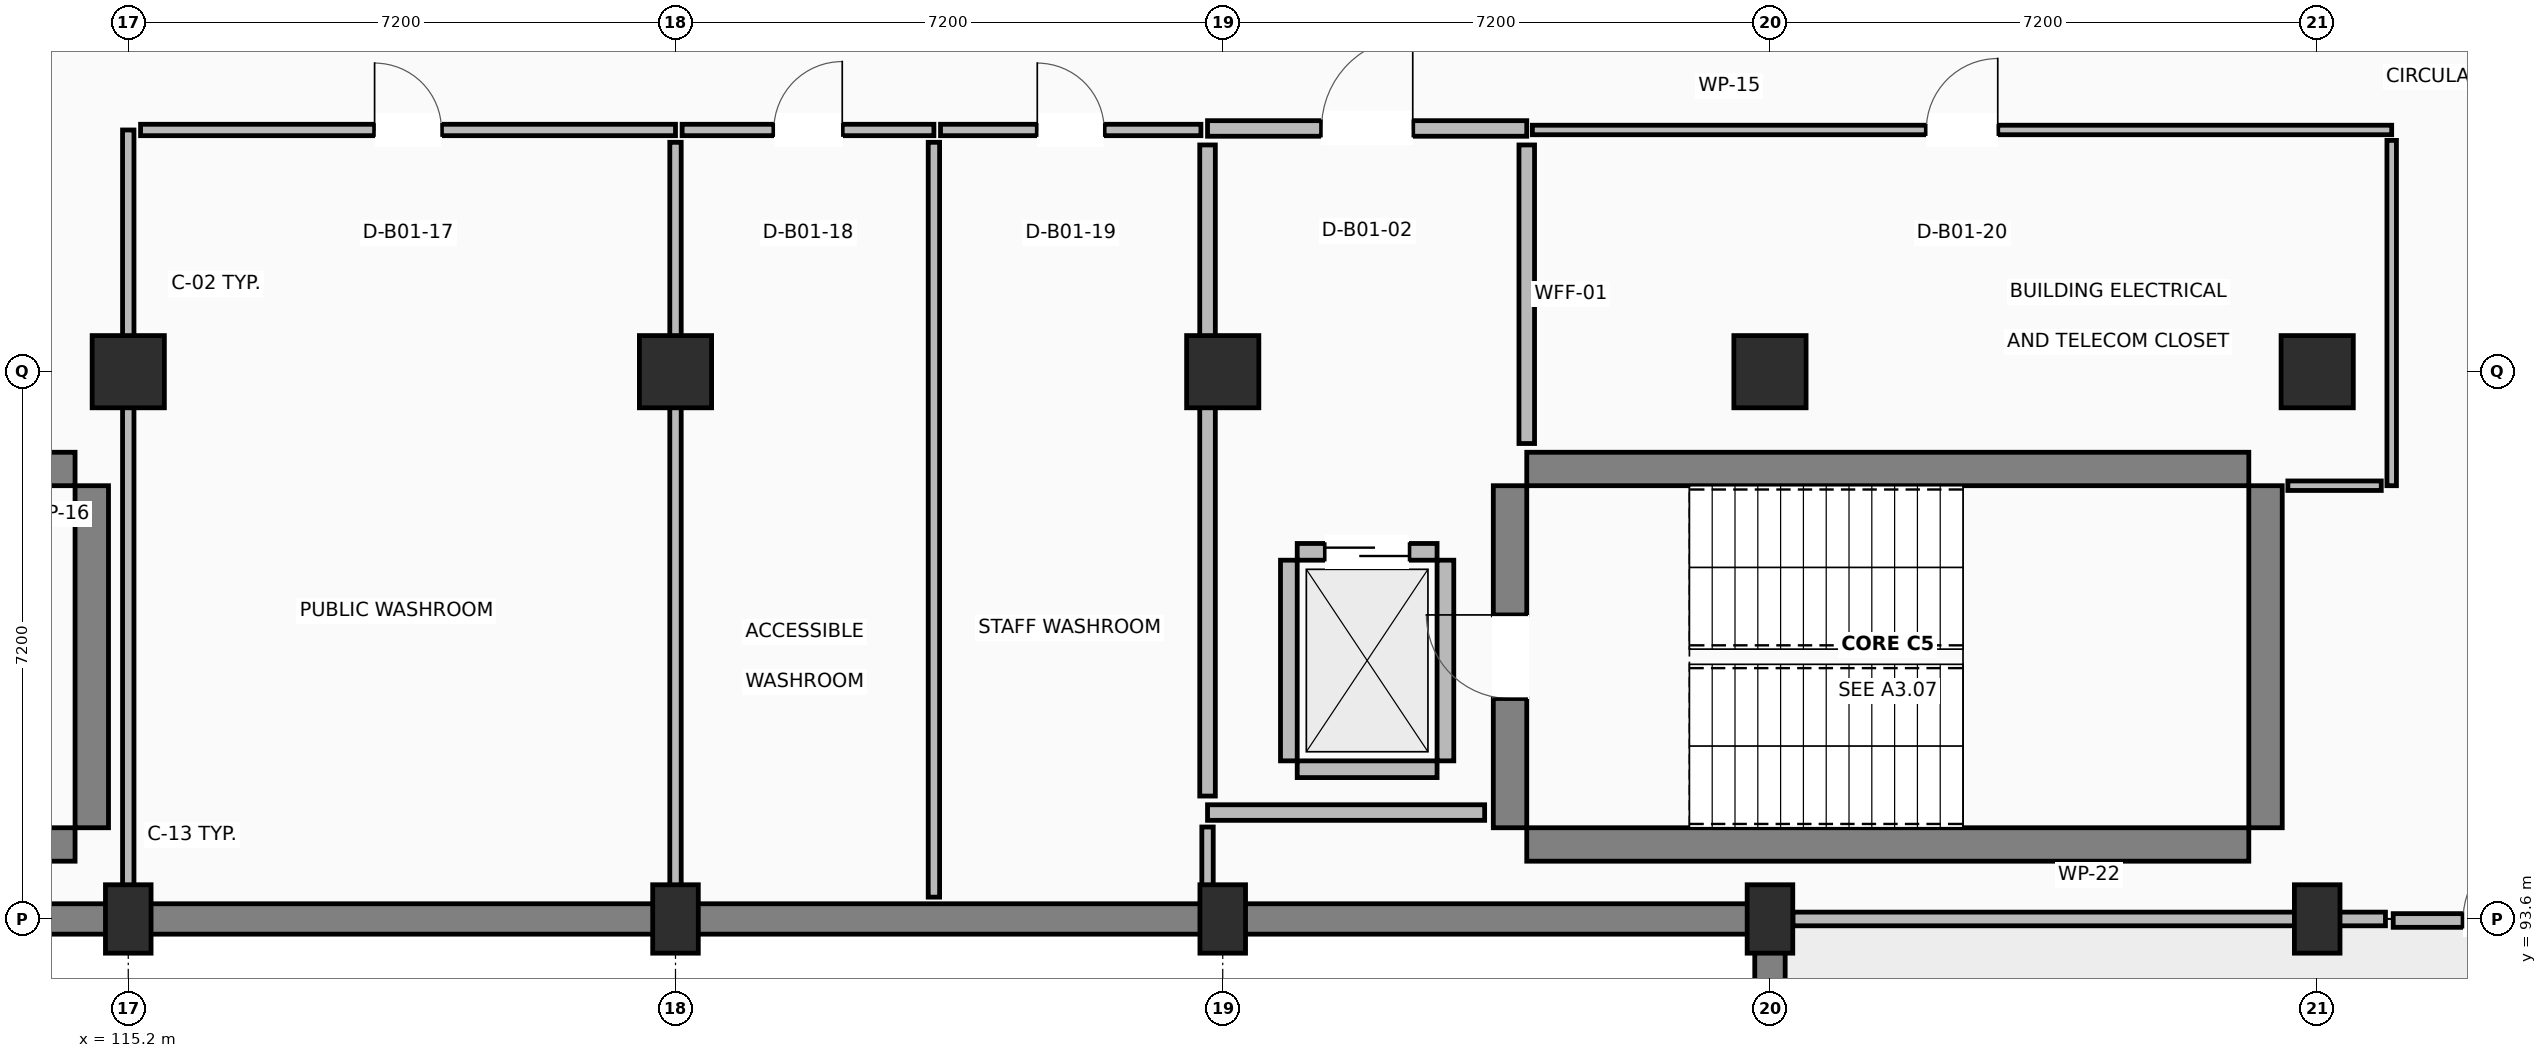
"""IFC4 building model, lengths in metres.
Left out: names, types, materials, properties, quantities, classifications, styles, units other than length and angle.
Written with IfcOpenShell. Run it as: python <this file> out.ifc"""

import sys

from ifc_helpers import new_model, si_unit, direction, frame, frame_2d, origin, origin_2d, place, context, subcontext, project, spatial, rectangle, extrude, element, fill, save


model = new_model("IFC4")
c1 = context("Model", 3, precision=1e-05, world=origin(), true_north=direction((0.0, 1.0)))
c2 = subcontext(c1, "Body", "Model", "MODEL_VIEW")
j1 = project(units=[si_unit("LENGTHUNIT", "METRE"), si_unit("PLANEANGLEUNIT", "RADIAN")], contexts=[c1])
p1 = place(None, origin())
s1 = spatial("IfcSite", under=j1, at=p1, CompositionType="ELEMENT")
p2 = place(p1, origin())
s2 = spatial("IfcBuilding", under=s1, at=p2, CompositionType="ELEMENT")
p3 = place(p2, frame((0.0, 0.0, -4.5)))
s3 = spatial("IfcBuildingStorey", under=s2, at=p3, CompositionType="ELEMENT", Elevation=-4.5)
p4 = place(p3, frame((115.2, 93.6, 0.0), z_axis=(0.0, 0.0, 1.0), x_axis=(1.0, 0.0, 0.0)))
e1 = element("IfcColumn", 1, at=p4, inside=s3, PredefinedType="COLUMN", context=c2, shape_type="SweptSolid", body=[
    extrude(rectangle(XDim=0.6, YDim=0.9, at=origin_2d()), origin(), (0.0, 0.0, 1.0), 4.15),
])
p5 = place(p3, frame((115.2, 100.8, 0.0), z_axis=(0.0, 0.0, 1.0), x_axis=(1.0, 0.0, 0.0)))
e2 = element("IfcColumn", 2, at=p5, inside=s3, PredefinedType="COLUMN", context=c2, shape_type="SweptSolid", body=[
    extrude(rectangle(XDim=0.95, YDim=0.95, at=origin_2d()), origin(), (0.0, 0.0, 1.0), 4.15),
])
p6 = place(p3, frame((122.4, 93.6, 0.0), z_axis=(0.0, 0.0, 1.0), x_axis=(1.0, 0.0, 0.0)))
e3 = element("IfcColumn", 3, at=p6, inside=s3, PredefinedType="COLUMN", context=c2, shape_type="SweptSolid", body=[
    extrude(rectangle(XDim=0.6, YDim=0.9, at=origin_2d()), origin(), (0.0, 0.0, 1.0), 4.15),
])
p7 = place(p3, frame((122.4, 100.8, 0.0), z_axis=(0.0, 0.0, 1.0), x_axis=(1.0, 0.0, 0.0)))
e4 = element("IfcColumn", 4, at=p7, inside=s3, PredefinedType="COLUMN", context=c2, shape_type="SweptSolid", body=[
    extrude(rectangle(XDim=0.95, YDim=0.95, at=origin_2d()), origin(), (0.0, 0.0, 1.0), 4.15),
])
p8 = place(p3, frame((129.6, 93.6, 0.0), z_axis=(0.0, 0.0, 1.0), x_axis=(1.0, 0.0, 0.0)))
e5 = element("IfcColumn", 5, at=p8, inside=s3, PredefinedType="COLUMN", context=c2, shape_type="SweptSolid", body=[
    extrude(rectangle(XDim=0.6, YDim=0.9, at=origin_2d()), origin(), (0.0, 0.0, 1.0), 4.15),
])
p9 = place(p3, frame((129.6, 100.8, 0.0), z_axis=(0.0, 0.0, 1.0), x_axis=(1.0, 0.0, 0.0)))
e6 = element("IfcColumn", 6, at=p9, inside=s3, PredefinedType="COLUMN", context=c2, shape_type="SweptSolid", body=[
    extrude(rectangle(XDim=0.95, YDim=0.95, at=origin_2d()), origin(), (0.0, 0.0, 1.0), 4.15),
])
p10 = place(p3, frame((136.8, 93.6, 0.0), z_axis=(0.0, 0.0, 1.0), x_axis=(1.0, 0.0, 0.0)))
e7 = element("IfcColumn", 7, at=p10, inside=s3, PredefinedType="COLUMN", context=c2, shape_type="SweptSolid", body=[
    extrude(rectangle(XDim=0.6, YDim=0.9, at=origin_2d()), origin(), (0.0, 0.0, 1.0), 4.15),
])
p11 = place(p3, frame((136.8, 100.8, 0.0), z_axis=(0.0, 0.0, 1.0), x_axis=(1.0, 0.0, 0.0)))
e8 = element("IfcColumn", 8, at=p11, inside=s3, PredefinedType="COLUMN", context=c2, shape_type="SweptSolid", body=[
    extrude(rectangle(XDim=0.95, YDim=0.95, at=origin_2d()), origin(), (0.0, 0.0, 1.0), 4.15),
])
p12 = place(p3, frame((144.0, 93.6, 0.0), z_axis=(0.0, 0.0, 1.0), x_axis=(1.0, 0.0, 0.0)))
e9 = element("IfcColumn", 9, at=p12, inside=s3, PredefinedType="COLUMN", context=c2, shape_type="SweptSolid", body=[
    extrude(rectangle(XDim=0.6, YDim=0.9, at=origin_2d()), origin(), (0.0, 0.0, 1.0), 4.15),
])
p13 = place(p3, frame((144.0, 100.8, 0.0), z_axis=(0.0, 0.0, 1.0), x_axis=(1.0, 0.0, 0.0)))
e10 = element("IfcColumn", 10, at=p13, inside=s3, PredefinedType="COLUMN", context=c2, shape_type="SweptSolid", body=[
    extrude(rectangle(XDim=0.95, YDim=0.95, at=origin_2d()), origin(), (0.0, 0.0, 1.0), 4.15),
])
p14 = place(p3, frame((136.8, 86.4, 0.0), z_axis=(0.0, 0.0, 1.0), x_axis=(0.0, 1.0, 0.0)))
e11 = element("IfcWall", 11, at=p14, inside=s3, PredefinedType="SOLIDWALL", context=c2, shape_type="SweptSolid", body=[
    extrude(rectangle(XDim=7.2, YDim=0.4, at=frame_2d((3.6, 0.0))), origin(), (0.0, 0.0, 1.0), 4.15),
])
p15 = place(p3, frame((136.8, 93.6, 0.0), z_axis=(0.0, 0.0, 1.0), x_axis=(-1.0, 0.0, 0.0)))
e12 = element("IfcWall", 12, at=p15, inside=s3, PredefinedType="SOLIDWALL", context=c2, shape_type="SweptSolid", body=[
    extrude(rectangle(XDim=79.2, YDim=0.4, at=frame_2d((39.6, 0.0))), origin(), (0.0, 0.0, 1.0), 4.15),
])
for number, where, z_axis, x_axis in (
    (13, (105.0, 94.58, 0.0), (0.0, 0.0, 1.0), (1.0, 0.0, 0.0)),
    (14, (105.0, 99.52, 0.0), (0.0, 0.0, 1.0), (1.0, 0.0, 0.0)),
):
    element("IfcWall", number, at=place(p3, frame(where, z_axis=z_axis, x_axis=x_axis)), inside=s3, PredefinedType="SHEAR", context=c2, shape_type="SweptSolid", body=[
        extrude(rectangle(XDim=9.5, YDim=0.44, at=frame_2d((4.75, 0.0))), origin(), (0.0, 0.0, 1.0), 4.15),
    ])
p16 = place(p3, frame((114.72, 94.8, 0.0), z_axis=(0.0, 0.0, 1.0), x_axis=(0.0, 1.0, 0.0)))
e15 = element("IfcWall", 15, at=p16, inside=s3, PredefinedType="SHEAR", context=c2, shape_type="SweptSolid", body=[
    extrude(rectangle(XDim=4.5, YDim=0.44, at=frame_2d((2.25, 0.0))), origin(), (0.0, 0.0, 1.0), 4.15),
])
for number, where, z_axis, x_axis in (
    (16, (133.6, 94.58, 0.0), (0.0, 0.0, 1.0), (1.0, 0.0, 0.0)),
    (17, (133.6, 99.52, 0.0), (0.0, 0.0, 1.0), (1.0, 0.0, 0.0)),
):
    element("IfcWall", number, at=place(p3, frame(where, z_axis=z_axis, x_axis=x_axis)), inside=s3, PredefinedType="SHEAR", context=c2, shape_type="SweptSolid", body=[
        extrude(rectangle(XDim=9.5, YDim=0.44, at=frame_2d((4.75, 0.0))), origin(), (0.0, 0.0, 1.0), 4.15),
    ])
p17 = place(p3, frame((133.38, 94.8, 0.0), z_axis=(0.0, 0.0, 1.0), x_axis=(0.0, 1.0, 0.0)))
e18 = element("IfcWall", 18, at=p17, inside=s3, PredefinedType="SHEAR", context=c2, shape_type="SweptSolid", body=[
    extrude(rectangle(XDim=4.5, YDim=0.44, at=frame_2d((2.25, 0.0))), origin(), (0.0, 0.0, 1.0), 4.15),
])
p18 = place(p17, frame((1.7, 0.0, 0.0)))
e19 = element("IfcOpeningElement", 19, at=p18, cuts=e18, PredefinedType="OPENING", context=c2, shape_type="SweptSolid", body=[
    extrude(rectangle(XDim=1.1, YDim=2.15, at=frame_2d((0.55, 1.075))), frame((0.0, 0.23, 0.0), z_axis=(0.0, -1.0, 0.0), x_axis=(1.0, 0.0, 0.0)), (0.0, 0.0, 1.0), 0.46),
])
p19 = place(p3, frame((143.32, 94.8, 0.0), z_axis=(0.0, 0.0, 1.0), x_axis=(0.0, 1.0, 0.0)))
e20 = element("IfcWall", 20, at=p19, inside=s3, PredefinedType="SHEAR", context=c2, shape_type="SweptSolid", body=[
    extrude(rectangle(XDim=4.5, YDim=0.44, at=frame_2d((2.25, 0.0))), origin(), (0.0, 0.0, 1.0), 4.15),
])
p20 = place(p3, frame((130.58, 95.57, 0.0), z_axis=(0.0, 0.0, 1.0), x_axis=(1.0, 0.0, 0.0)))
e21 = element("IfcWall", 21, at=p20, inside=s3, PredefinedType="STANDARD", context=c2, shape_type="SweptSolid", body=[
    extrude(rectangle(XDim=1.84, YDim=0.22, at=frame_2d((0.92, 0.0))), origin(), (0.0, 0.0, 1.0), 3.19),
])
p21 = place(p3, frame((130.58, 98.43, 0.0), z_axis=(0.0, 0.0, 1.0), x_axis=(1.0, 0.0, 0.0)))
e22 = element("IfcWall", 22, at=p21, inside=s3, PredefinedType="STANDARD", context=c2, shape_type="SweptSolid", body=[
    extrude(rectangle(XDim=1.84, YDim=0.22, at=frame_2d((0.92, 0.0))), origin(), (0.0, 0.0, 1.0), 3.19),
])
p22 = place(p21, frame((0.37, 0.0, 0.0)))
e23 = element("IfcOpeningElement", 23, at=p22, cuts=e22, PredefinedType="OPENING", context=c2, shape_type="SweptSolid", body=[
    extrude(rectangle(XDim=1.1, YDim=2.15, at=frame_2d((0.55, 1.075))), frame((0.0, 0.12, 0.0), z_axis=(0.0, -1.0, 0.0), x_axis=(1.0, 0.0, 0.0)), (0.0, 0.0, 1.0), 0.24),
])
for number, where, z_axis, x_axis in (
    (24, (130.47, 95.68, 0.0), (0.0, 0.0, 1.0), (0.0, 1.0, 0.0)),
    (25, (132.53, 95.68, 0.0), (0.0, 0.0, 1.0), (0.0, 1.0, 0.0)),
):
    element("IfcWall", number, at=place(p3, frame(where, z_axis=z_axis, x_axis=x_axis)), inside=s3, PredefinedType="STANDARD", context=c2, shape_type="SweptSolid", body=[
        extrude(rectangle(XDim=2.64, YDim=0.22, at=frame_2d((1.32, 0.0))), origin(), (0.0, 0.0, 1.0), 3.19),
    ])
p23 = place(p3, frame((129.4, 104.0, 0.0), z_axis=(0.0, 0.0, 1.0), x_axis=(1.0, 0.0, 0.0)))
e26 = element("IfcWall", 26, at=p23, inside=s3, PredefinedType="PARTITIONING", context=c2, shape_type="SweptSolid", body=[
    extrude(rectangle(XDim=4.2, YDim=0.205, at=frame_2d((2.1, 0.0))), origin(), (0.0, 0.0, 1.0), 3.19),
])
p24 = place(p23, frame((1.5, 0.0, 0.0)))
e27 = element("IfcOpeningElement", 27, at=p24, cuts=e26, PredefinedType="OPENING", context=c2, shape_type="SweptSolid", body=[
    extrude(rectangle(XDim=1.2, YDim=2.15, at=frame_2d((0.6, 1.075))), frame((0.0, 0.113, 0.0), z_axis=(0.0, -1.0, 0.0), x_axis=(1.0, 0.0, 0.0)), (0.0, 0.0, 1.0), 0.225),
])
p25 = place(p3, frame((133.6, 103.783, 0.0), z_axis=(0.0, 0.0, 1.0), x_axis=(0.0, -1.0, 0.0)))
e28 = element("IfcWall", 28, at=p25, inside=s3, PredefinedType="PARTITIONING", context=c2, shape_type="SweptSolid", body=[
    extrude(rectangle(XDim=3.928, YDim=0.205, at=frame_2d((1.964, 0.0))), origin(), (0.0, 0.0, 1.0), 3.19),
])
p26 = place(p3, frame((133.046, 95.0, 0.0), z_axis=(0.0, 0.0, 1.0), x_axis=(-1.0, 0.0, 0.0)))
e29 = element("IfcWall", 29, at=p26, inside=s3, PredefinedType="PARTITIONING", context=c2, shape_type="SweptSolid", body=[
    extrude(rectangle(XDim=3.646, YDim=0.205, at=frame_2d((1.823, 0.0))), origin(), (0.0, 0.0, 1.0), 3.19),
])
p27 = place(p3, frame((129.4, 95.217, 0.0), z_axis=(0.0, 0.0, 1.0), x_axis=(0.0, 1.0, 0.0)))
e30 = element("IfcWall", 30, at=p27, inside=s3, PredefinedType="PARTITIONING", context=c2, shape_type="SweptSolid", body=[
    extrude(rectangle(XDim=8.566, YDim=0.205, at=frame_2d((4.283, 0.0))), origin(), (0.0, 0.0, 1.0), 3.19),
])
p28 = place(p3, frame((115.2, 93.887, 0.0), z_axis=(0.0, 0.0, 1.0), x_axis=(0.0, 1.0, 0.0)))
e31 = element("IfcWall", 31, at=p28, inside=s3, PredefinedType="PARTITIONING", context=c2, shape_type="SweptSolid", body=[
    extrude(rectangle(XDim=10.093, YDim=0.15, at=frame_2d((5.046, 0.0))), origin(), (0.0, 0.0, 1.0), 3.19),
])
p29 = place(p3, frame((115.362, 103.98, 0.0), z_axis=(0.0, 0.0, 1.0), x_axis=(1.0, 0.0, 0.0)))
e32 = element("IfcWall", 32, at=p29, inside=s3, PredefinedType="PARTITIONING", context=c2, shape_type="SweptSolid", body=[
    extrude(rectangle(XDim=7.038, YDim=0.15, at=frame_2d((3.519, 0.0))), origin(), (0.0, 0.0, 1.0), 3.19),
])
p30 = place(p29, frame((3.079, 0.0, 0.0)))
e33 = element("IfcOpeningElement", 33, at=p30, cuts=e32, PredefinedType="OPENING", context=c2, shape_type="SweptSolid", body=[
    extrude(rectangle(XDim=0.88, YDim=2.1, at=frame_2d((0.44, 1.05))), frame((0.0, 0.085, 0.0), z_axis=(0.0, -1.0, 0.0), x_axis=(1.0, 0.0, 0.0)), (0.0, 0.0, 1.0), 0.17),
])
p31 = place(p3, frame((122.4, 103.818, 0.0), z_axis=(0.0, 0.0, 1.0), x_axis=(0.0, -1.0, 0.0)))
e34 = element("IfcWall", 34, at=p31, inside=s3, PredefinedType="PARTITIONING", context=c2, shape_type="SweptSolid", body=[
    extrude(rectangle(XDim=9.931, YDim=0.15, at=frame_2d((4.966, 0.0))), origin(), (0.0, 0.0, 1.0), 3.19),
])
p32 = place(p3, frame((122.487, 103.98, 0.0), z_axis=(0.0, 0.0, 1.0), x_axis=(1.0, 0.0, 0.0)))
e35 = element("IfcWall", 35, at=p32, inside=s3, PredefinedType="PARTITIONING", context=c2, shape_type="SweptSolid", body=[
    extrude(rectangle(XDim=3.313, YDim=0.15, at=frame_2d((1.656, 0.0))), origin(), (0.0, 0.0, 1.0), 3.19),
])
p33 = place(p32, frame((1.207, 0.0, 0.0)))
e36 = element("IfcOpeningElement", 36, at=p33, cuts=e35, PredefinedType="OPENING", context=c2, shape_type="SweptSolid", body=[
    extrude(rectangle(XDim=0.9, YDim=2.1, at=frame_2d((0.45, 1.05))), frame((0.0, 0.085, 0.0), z_axis=(0.0, -1.0, 0.0), x_axis=(1.0, 0.0, 0.0)), (0.0, 0.0, 1.0), 0.17),
])
p34 = place(p3, frame((125.8, 103.818, 0.0), z_axis=(0.0, 0.0, 1.0), x_axis=(0.0, -1.0, 0.0)))
e37 = element("IfcWall", 37, at=p34, inside=s3, PredefinedType="PARTITIONING", context=c2, shape_type="SweptSolid", body=[
    extrude(rectangle(XDim=9.931, YDim=0.15, at=frame_2d((4.966, 0.0))), origin(), (0.0, 0.0, 1.0), 3.19),
])
p35 = place(p3, frame((125.887, 103.98, 0.0), z_axis=(0.0, 0.0, 1.0), x_axis=(1.0, 0.0, 0.0)))
e38 = element("IfcWall", 38, at=p35, inside=s3, PredefinedType="PARTITIONING", context=c2, shape_type="SweptSolid", body=[
    extrude(rectangle(XDim=3.426, YDim=0.15, at=frame_2d((1.713, 0.0))), origin(), (0.0, 0.0, 1.0), 3.19),
])
p36 = place(p35, frame((1.273, 0.0, 0.0)))
e39 = element("IfcOpeningElement", 39, at=p36, cuts=e38, PredefinedType="OPENING", context=c2, shape_type="SweptSolid", body=[
    extrude(rectangle(XDim=0.88, YDim=2.1, at=frame_2d((0.44, 1.05))), frame((0.0, 0.085, 0.0), z_axis=(0.0, -1.0, 0.0), x_axis=(1.0, 0.0, 0.0)), (0.0, 0.0, 1.0), 0.17),
])
p37 = place(p3, frame((129.4, 94.81, 0.0), z_axis=(0.0, 0.0, 1.0), x_axis=(0.0, -1.0, 0.0)))
e40 = element("IfcWall", 40, at=p37, inside=s3, PredefinedType="PARTITIONING", context=c2, shape_type="SweptSolid", body=[
    extrude(rectangle(XDim=0.923, YDim=0.15, at=frame_2d((0.461, 0.0))), origin(), (0.0, 0.0, 1.0), 3.19),
])
p38 = place(p3, frame((133.674, 103.98, 0.0), z_axis=(0.0, 0.0, 1.0), x_axis=(1.0, 0.0, 0.0)))
e41 = element("IfcWall", 41, at=p38, inside=s3, PredefinedType="PARTITIONING", context=c2, shape_type="SweptSolid", body=[
    extrude(rectangle(XDim=11.306, YDim=0.125, at=frame_2d((5.653, 0.0))), origin(), (0.0, 0.0, 1.0), 3.19),
])
p39 = place(p38, frame((5.183, 0.0, 0.0)))
e42 = element("IfcOpeningElement", 42, at=p39, cuts=e41, PredefinedType="OPENING", context=c2, shape_type="SweptSolid", body=[
    extrude(rectangle(XDim=0.94, YDim=2.1, at=frame_2d((0.47, 1.05))), frame((0.0, 0.073, 0.0), z_axis=(0.0, -1.0, 0.0), x_axis=(1.0, 0.0, 0.0)), (0.0, 0.0, 1.0), 0.145),
])
p40 = place(p3, frame((144.98, 103.843, 0.0), z_axis=(0.0, 0.0, 1.0), x_axis=(0.0, -1.0, 0.0)))
e43 = element("IfcWall", 43, at=p40, inside=s3, PredefinedType="PARTITIONING", context=c2, shape_type="SweptSolid", body=[
    extrude(rectangle(XDim=4.543, YDim=0.125, at=frame_2d((2.271, 0.0))), origin(), (0.0, 0.0, 1.0), 3.19),
])
p41 = place(p3, frame((144.843, 99.3, 0.0), z_axis=(0.0, 0.0, 1.0), x_axis=(-1.0, 0.0, 0.0)))
e44 = element("IfcWall", 44, at=p41, inside=s3, PredefinedType="PARTITIONING", context=c2, shape_type="SweptSolid", body=[
    extrude(rectangle(XDim=1.229, YDim=0.125, at=frame_2d((0.615, 0.0))), origin(), (0.0, 0.0, 1.0), 3.19),
])
p42 = place(p3, frame((145.0, 93.58, 0.0), z_axis=(0.0, 0.0, 1.0), x_axis=(1.0, 0.0, 0.0)))
e45 = element("IfcWall", 45, at=p42, inside=s3, PredefinedType="PARTITIONING", context=c2, shape_type="SweptSolid", body=[
    extrude(rectangle(XDim=2.918, YDim=0.18, at=frame_2d((1.459, 0.0))), origin(), (0.0, 0.0, 1.0), 3.19),
])
p43 = place(p42, frame((0.919, 0.0, 0.0)))
e46 = element("IfcOpeningElement", 46, at=p43, cuts=e45, PredefinedType="OPENING", context=c2, shape_type="SweptSolid", body=[
    extrude(rectangle(XDim=1.08, YDim=2.15, at=frame_2d((0.54, 1.075))), frame((0.0, 0.1, 0.0), z_axis=(0.0, -1.0, 0.0), x_axis=(1.0, 0.0, 0.0)), (0.0, 0.0, 1.0), 0.2),
])
p44 = place(p3, frame((137.102, 93.6, 0.0), z_axis=(0.0, 0.0, 1.0), x_axis=(1.0, 0.0, 0.0)))
e47 = element("IfcWall", 47, at=p44, inside=s3, PredefinedType="PARTITIONING", context=c2, shape_type="SweptSolid", body=[
    extrude(rectangle(XDim=7.796, YDim=0.18, at=frame_2d((3.898, 0.0))), origin(), (0.0, 0.0, 1.0), 3.19),
])
p45 = place(p18, origin())
e48 = element("IfcDoor", 48, at=p45, inside=s3, OperationType="SINGLE_SWING_RIGHT", PredefinedType="DOOR", context=c2, shape_type="SweptSolid", body=[
    extrude(rectangle(XDim=1.1, YDim=2.15, at=frame_2d((0.55, 1.075))), frame((0.0, 0.025, 0.0), z_axis=(0.0, -1.0, 0.0), x_axis=(1.0, 0.0, 0.0)), (0.0, 0.0, 1.0), 0.05),
])
fill(e19, e48)
p46 = place(p22, origin())
e49 = element("IfcDoor", 49, at=p46, inside=s3, OperationType="SLIDING_TO_RIGHT", PredefinedType="DOOR", context=c2, shape_type="SweptSolid", body=[
    extrude(rectangle(XDim=1.1, YDim=2.15, at=frame_2d((0.55, 1.075))), frame((0.0, 0.025, 0.0), z_axis=(0.0, -1.0, 0.0), x_axis=(1.0, 0.0, 0.0)), (0.0, 0.0, 1.0), 0.05),
])
fill(e23, e49)
p47 = place(p24, origin())
e50 = element("IfcDoor", 50, at=p47, inside=s3, OperationType="SINGLE_SWING_RIGHT", PredefinedType="DOOR", context=c2, shape_type="SweptSolid", body=[
    extrude(rectangle(XDim=1.2, YDim=2.15, at=frame_2d((0.6, 1.075))), frame((0.0, 0.025, 0.0), z_axis=(0.0, -1.0, 0.0), x_axis=(1.0, 0.0, 0.0)), (0.0, 0.0, 1.0), 0.05),
])
fill(e27, e50)
p48 = place(p30, origin())
e51 = element("IfcDoor", 51, at=p48, inside=s3, OperationType="SINGLE_SWING_LEFT", PredefinedType="DOOR", context=c2, shape_type="SweptSolid", body=[
    extrude(rectangle(XDim=0.88, YDim=2.1, at=frame_2d((0.44, 1.05))), frame((0.0, 0.025, 0.0), z_axis=(0.0, -1.0, 0.0), x_axis=(1.0, 0.0, 0.0)), (0.0, 0.0, 1.0), 0.05),
])
fill(e33, e51)
p49 = place(p33, origin())
e52 = element("IfcDoor", 52, at=p49, inside=s3, OperationType="SINGLE_SWING_RIGHT", PredefinedType="DOOR", context=c2, shape_type="SweptSolid", body=[
    extrude(rectangle(XDim=0.9, YDim=2.1, at=frame_2d((0.45, 1.05))), frame((0.0, 0.025, 0.0), z_axis=(0.0, -1.0, 0.0), x_axis=(1.0, 0.0, 0.0)), (0.0, 0.0, 1.0), 0.05),
])
fill(e36, e52)
p50 = place(p36, origin())
e53 = element("IfcDoor", 53, at=p50, inside=s3, OperationType="SINGLE_SWING_LEFT", PredefinedType="DOOR", context=c2, shape_type="SweptSolid", body=[
    extrude(rectangle(XDim=0.88, YDim=2.1, at=frame_2d((0.44, 1.05))), frame((0.0, 0.025, 0.0), z_axis=(0.0, -1.0, 0.0), x_axis=(1.0, 0.0, 0.0)), (0.0, 0.0, 1.0), 0.05),
])
fill(e39, e53)
p51 = place(p39, origin())
e54 = element("IfcDoor", 54, at=p51, inside=s3, OperationType="SINGLE_SWING_RIGHT", PredefinedType="DOOR", context=c2, shape_type="SweptSolid", body=[
    extrude(rectangle(XDim=0.94, YDim=2.1, at=frame_2d((0.47, 1.05))), frame((0.0, 0.025, 0.0), z_axis=(0.0, -1.0, 0.0), x_axis=(1.0, 0.0, 0.0)), (0.0, 0.0, 1.0), 0.05),
])
fill(e42, e54)
p52 = place(p43, origin())
e55 = element("IfcDoor", 55, at=p52, inside=s3, OperationType="SINGLE_SWING_RIGHT", PredefinedType="DOOR", context=c2, shape_type="SweptSolid", body=[
    extrude(rectangle(XDim=1.08, YDim=2.15, at=frame_2d((0.54, 1.075))), frame((0.0, 0.025, 0.0), z_axis=(0.0, -1.0, 0.0), x_axis=(1.0, 0.0, 0.0)), (0.0, 0.0, 1.0), 0.05),
])
fill(e46, e55)
save(model, sys.argv[1])
